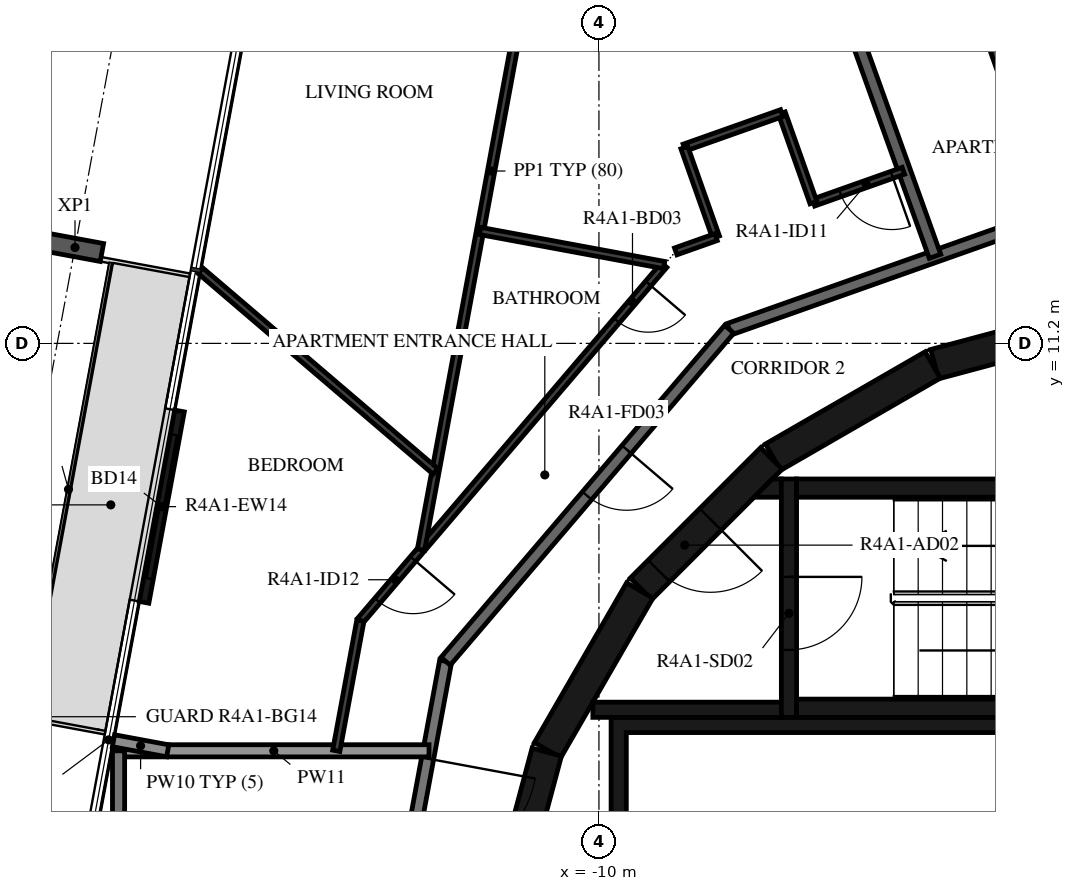
"""IFC4 building model, lengths in metres.
Left out: names, types, materials, properties, quantities, classifications, styles, units other than length and angle.
Written with IfcOpenShell. Run it as: python <this file> out.ifc"""

import sys

from ifc_helpers import new_model, si_unit, direction, frame, frame_2d, origin, origin_2d, place, context, subcontext, project, spatial, polyline, rectangle, i_section, outline, extrude, element, fill, save


model = new_model("IFC4")
c1 = context("Model", 3, precision=1e-05, world=origin(), true_north=direction((0.0, 1.0)))
c2 = subcontext(c1, "Body", "Model", "MODEL_VIEW")
j1 = project(units=[si_unit("LENGTHUNIT", "METRE"), si_unit("PLANEANGLEUNIT", "RADIAN")], contexts=[c1])
p1 = place(None, origin())
s1 = spatial("IfcSite", under=j1, at=p1, CompositionType="ELEMENT")
p2 = place(p1, origin())
s2 = spatial("IfcBuilding", under=s1, at=p2, CompositionType="ELEMENT")
p3 = place(p2, frame((0.0, 0.0, 155.2)))
s3 = spatial("IfcBuildingStorey", under=s2, at=p3, CompositionType="ELEMENT", Elevation=155.2)
p4 = place(p3, frame((-18.616, 12.777, -0.38), z_axis=(0.0, 0.0, 1.0), x_axis=(0.182235967681, 0.983254825609, 0.0)))
e1 = element("IfcColumn", 1, at=p4, inside=s3, PredefinedType="COLUMN", context=c2, shape_type="SweptSolid", body=[
    extrude(i_section(OverallWidth=0.3, OverallDepth=0.9, WebThickness=0.019, FlangeThickness=0.035, FilletRadius=0.03, at=origin_2d()), origin(), (0.0, 0.0, 1.0), 3.5),
])
p5 = place(p3, frame((-16.897, 10.088, 0.0), z_axis=(0.0, 0.0, 1.0), x_axis=(-0.18226136951, -0.983250117307, 0.0)))
e2 = element("IfcWall", 2, at=p5, inside=s3, PredefinedType="STANDARD", context=c2, shape_type="SweptSolid", body=[
    extrude(rectangle(XDim=3.2, YDim=0.16, at=frame_2d((1.6, 0.0))), origin(), (0.0, 0.0, 1.0), 3.12),
])
p6 = place(p5, frame((0.4, 0.0, 0.0)))
e3 = element("IfcOpeningElement", 3, at=p6, cuts=e2, PredefinedType="OPENING", context=c2, shape_type="SweptSolid", body=[
    extrude(rectangle(XDim=2.4, YDim=2.4, at=frame_2d((1.2, 1.2))), frame((0.0, 0.09, 0.0), z_axis=(0.0, -1.0, 0.0), x_axis=(1.0, 0.0, 0.0)), (0.0, 0.0, 1.0), 0.18),
])
for number, where, z_axis, x_axis in (
    (4, (-1.55, 11.643, 0.0), (0.0, 0.0, 1.0), (-0.966, -0.259, 0.0)),
    (5, (-4.51, 10.845, 0.0), (0.0, 0.0, 1.0), (-0.866, -0.5, 0.0)),
):
    element("IfcWall", number, at=place(p3, frame(where, z_axis=z_axis, x_axis=x_axis)), inside=s3, PredefinedType="SHEAR", context=c2, shape_type="SweptSolid", body=[
        extrude(rectangle(XDim=3.033, YDim=0.5, at=frame_2d((1.516, 0.0))), origin(), (0.0, 0.0, 1.0), 3.12),
    ])
p7 = place(p3, frame((-7.164, 9.308, 0.0), z_axis=(0.0, 0.0, 1.0), x_axis=(-0.707106781187, -0.707106781187, 0.0)))
e6 = element("IfcWall", 6, at=p7, inside=s3, PredefinedType="SHEAR", context=c2, shape_type="SweptSolid", body=[
    extrude(rectangle(XDim=3.032, YDim=0.5, at=frame_2d((1.516, 0.0))), origin(), (0.0, 0.0, 1.0), 3.12),
])
p8 = place(p7, frame((1.416, 0.0, 0.0)))
e7 = element("IfcOpeningElement", 7, at=p8, cuts=e6, PredefinedType="OPENING", context=c2, shape_type="SweptSolid", body=[
    extrude(rectangle(XDim=1.2, YDim=2.1, at=frame_2d((0.6, 1.05))), frame((0.0, 0.26, 0.0), z_axis=(0.0, -1.0, 0.0), x_axis=(1.0, 0.0, 0.0)), (0.0, 0.0, 1.0), 0.52),
])
for number, where, z_axis, x_axis in (
    (8, (-9.329, 7.137, 0.0), (0.0, 0.0, 1.0), (-0.5, -0.866, 0.0)),
    (9, (-10.858, 4.479, 0.0), (0.0, 0.0, 1.0), (-0.259, -0.966, 0.0)),
):
    element("IfcWall", number, at=place(p3, frame(where, z_axis=z_axis, x_axis=x_axis)), inside=s3, PredefinedType="SHEAR", context=c2, shape_type="SweptSolid", body=[
        extrude(rectangle(XDim=3.033, YDim=0.5, at=frame_2d((1.516, 0.0))), origin(), (0.0, 0.0, 1.0), 3.12),
    ])
for number, where, z_axis, x_axis in (
    (10, (-6.75, 5.2, 0.0), (0.0, 0.0, 1.0), (1.0, 0.0, 0.0)),
    (11, (-6.75, 8.82, 0.0), (0.0, 0.0, 1.0), (1.0, 0.0, 0.0)),
):
    element("IfcWall", number, at=place(p3, frame(where, z_axis=z_axis, x_axis=x_axis)), inside=s3, PredefinedType="SHEAR", context=c2, shape_type="SweptSolid", body=[
        extrude(rectangle(XDim=6.75, YDim=0.3, at=frame_2d((3.375, 0.0))), origin(), (0.0, 0.0, 1.0), 3.12),
    ])
p9 = place(p3, frame((-6.875, 8.97, 0.0), z_axis=(0.0, 0.0, 1.0), x_axis=(0.0, -1.0, 0.0)))
e12 = element("IfcWall", 12, at=p9, inside=s3, PredefinedType="SHEAR", context=c2, shape_type="SweptSolid", body=[
    extrude(rectangle(XDim=3.92, YDim=0.25, at=frame_2d((1.96, 0.0))), origin(), (0.0, 0.0, 1.0), 3.12),
])
p10 = place(p9, frame((1.61, 0.0, 0.0)))
e13 = element("IfcOpeningElement", 13, at=p10, cuts=e12, PredefinedType="OPENING", context=c2, shape_type="SweptSolid", body=[
    extrude(rectangle(XDim=1.2, YDim=2.1, at=frame_2d((0.6, 1.05))), frame((0.0, 0.135, 0.0), z_axis=(0.0, -1.0, 0.0), x_axis=(1.0, 0.0, 0.0)), (0.0, 0.0, 1.0), 0.27),
])
p11 = place(p3, frame((-7.0, 5.175, 0.0), z_axis=(0.0, 0.0, 1.0), x_axis=(-1.0, 0.0, 0.0)))
e14 = element("IfcWall", 14, at=p11, inside=s3, PredefinedType="SHEAR", context=c2, shape_type="SweptSolid", body=[
    extrude(rectangle(XDim=3.1, YDim=0.25, at=frame_2d((1.55, 0.0))), origin(), (0.0, 0.0, 1.0), 3.12),
])
p12 = place(p3, origin())
e15 = element("IfcWall", 15, at=p12, inside=s3, PredefinedType="SHEAR", context=c2, shape_type="SweptSolid", body=[
    extrude(outline(polyline([(-7.148, 8.97), (-7.0, 8.97), (-7.0, 8.67), (-7.448, 8.67), (-7.148, 8.97)])), origin(), (0.0, 0.0, 1.0), 3.12),
])
p13 = place(p3, origin())
e16 = element("IfcWall", 16, at=p13, inside=s3, PredefinedType="SHEAR", context=c2, shape_type="SweptSolid", body=[
    extrude(outline(polyline([(-9.55, 4.8), (-1.2, 4.8), (-1.2, 1.9), (-0.95, 1.9), (-0.95, 4.8), (0.95, 4.8), (0.95, 1.9), (1.2, 1.9), (1.2, 4.8), (3.1, 4.8), (3.1, 1.9), (3.35, 1.9), (3.35, 4.8), (5.25, 4.8), (5.25, 1.9), (5.5, 1.9), (5.5, 4.8), (7.4, 4.8), (7.4, 1.9), (7.65, 1.9), (7.65, 4.8), (9.55, 4.8), (9.55, 1.9), (9.8, 1.9), (9.8, 4.8), (9.8, 5.05), (-9.8, 5.05), (-9.8, 4.8), (-9.8, 1.9), (-9.55, 1.9), (-9.55, 4.8)])), origin(), (0.0, 0.0, 1.0), 3.12),
])
p14 = place(p3, frame((-12.521, 5.972, 0.0), z_axis=(0.0, 0.0, 1.0), x_axis=(-0.182251559718, -0.983251935661, 0.0)))
e17 = element("IfcWall", 17, at=p14, inside=s3, PredefinedType="STANDARD", context=c2, shape_type="SweptSolid", body=[
    extrude(rectangle(XDim=5.117, YDim=0.2, at=frame_2d((2.559, 0.0))), origin(), (0.0, 0.0, 1.0), 3.12),
])
p15 = place(p14, frame((1.627, 0.0, 0.0)))
e18 = element("IfcOpeningElement", 18, at=p15, cuts=e17, PredefinedType="OPENING", context=c2, shape_type="SweptSolid", body=[
    extrude(rectangle(XDim=1.8, YDim=2.1, at=frame_2d((0.9, 1.05))), frame((0.0, 0.11, 0.0), z_axis=(0.0, -1.0, 0.0), x_axis=(1.0, 0.0, 0.0)), (0.0, 0.0, 1.0), 0.22),
])
p16 = place(p3, frame((-2.359, 13.38, 0.0), z_axis=(0.0, 0.0, 1.0), x_axis=(-0.942647529236, -0.333789807551, 0.0)))
e19 = element("IfcWall", 19, at=p16, inside=s3, PredefinedType="STANDARD", context=c2, shape_type="SweptSolid", body=[
    extrude(rectangle(XDim=5.833, YDim=0.2, at=frame_2d((2.917, 0.0))), origin(), (0.0, 0.0, 1.0), 3.12),
])
p17 = place(p3, frame((-7.858, 11.433, 0.0), z_axis=(0.0, 0.0, 1.0), x_axis=(-0.649440801937, -0.760412154545, 0.0)))
e20 = element("IfcWall", 20, at=p17, inside=s3, PredefinedType="STANDARD", context=c2, shape_type="SweptSolid", body=[
    extrude(rectangle(XDim=7.181, YDim=0.2, at=frame_2d((3.59, 0.0))), origin(), (0.0, 0.0, 1.0), 3.12),
])
p18 = place(p17, frame((2.6, 0.0, 0.0)))
e21 = element("IfcOpeningElement", 21, at=p18, cuts=e20, PredefinedType="OPENING", context=c2, shape_type="SweptSolid", body=[
    extrude(rectangle(XDim=1.0, YDim=2.1, at=frame_2d((0.5, 1.05))), frame((0.0, 0.11, 0.0), z_axis=(0.0, -1.0, 0.0), x_axis=(1.0, 0.0, 0.0)), (0.0, 0.0, 1.0), 0.22),
])
p19 = place(p3, frame((-12.794, 4.5, 0.0), z_axis=(0.0, 0.0, 1.0), x_axis=(-1.0, 0.0, 0.0)))
e22 = element("IfcWall", 22, at=p19, inside=s3, PredefinedType="STANDARD", context=c2, shape_type="SweptSolid", body=[
    extrude(rectangle(XDim=5.106, YDim=0.2, at=frame_2d((2.553, 0.0))), origin(), (0.0, 0.0, 1.0), 2.73),
])
p20 = place(p3, frame((-17.9, 4.5, 0.0), z_axis=(0.0, 0.0, 1.0), x_axis=(0.0, -1.0, 0.0)))
e23 = element("IfcWall", 23, at=p20, inside=s3, PredefinedType="STANDARD", context=c2, shape_type="SweptSolid", body=[
    extrude(rectangle(XDim=9.0, YDim=0.2, at=frame_2d((4.5, 0.0))), origin(), (0.0, 0.0, 1.0), 3.12),
])
p21 = place(p3, frame((-6.185, 17.402, 0.0), z_axis=(0.0, 0.0, 1.0), x_axis=(0.337736730281, -0.941240618024, 0.0)))
e24 = element("IfcWall", 24, at=p21, inside=s3, PredefinedType="STANDARD", context=c2, shape_type="SweptSolid", body=[
    extrude(rectangle(XDim=5.068, YDim=0.2, at=frame_2d((2.534, 0.0))), origin(), (0.0, 0.0, 1.0), 3.12),
])
p22 = place(p3, frame((-17.984, 4.665, 0.0), z_axis=(0.0, 0.0, 1.0), x_axis=(0.98328378843, -0.182079629313, 0.0)))
e25 = element("IfcWall", 25, at=p22, inside=s3, PredefinedType="STANDARD", context=c2, shape_type="SweptSolid", body=[
    extrude(rectangle(XDim=0.908, YDim=0.2, at=frame_2d((0.454, 0.0))), origin(), (0.0, 0.0, 1.0), 2.73),
])
p23 = place(p3, frame((8.702, 12.206, 0.0), z_axis=(0.0, 0.0, 1.0), x_axis=(-0.760401313718, 0.649453494945, 0.0)))
e26 = element("IfcWall", 26, at=p23, inside=s3, PredefinedType="PARTITIONING", context=c2, shape_type="SweptSolid", body=[
    extrude(rectangle(XDim=16.724, YDim=0.12, at=frame_2d((8.362, 0.0))), origin(), (0.0, 0.0, 1.0), 3.12),
])
p24 = place(p23, frame((0.2, 0.0, 0.0)))
e27 = element("IfcOpeningElement", 27, at=p24, cuts=e26, PredefinedType="OPENING", context=c2, shape_type="SweptSolid", body=[
    extrude(rectangle(XDim=0.9, YDim=2.1, at=frame_2d((0.45, 1.05))), frame((0.0, 0.07, 0.0), z_axis=(0.0, -1.0, 0.0), x_axis=(1.0, 0.0, 0.0)), (0.0, 0.0, 1.0), 0.14),
])
p25 = place(p23, frame((7.099, 0.0, 0.0)))
e28 = element("IfcOpeningElement", 28, at=p25, cuts=e26, PredefinedType="OPENING", context=c2, shape_type="SweptSolid", body=[
    extrude(rectangle(XDim=0.9, YDim=2.1, at=frame_2d((0.45, 1.05))), frame((0.0, 0.07, 0.0), z_axis=(0.0, -1.0, 0.0), x_axis=(1.0, 0.0, 0.0)), (0.0, 0.0, 1.0), 0.14),
])
p26 = place(p3, frame((-3.048, 14.727, 0.0), z_axis=(0.0, 0.0, 1.0), x_axis=(-0.333811603187, 0.942639811157, 0.0)))
e29 = element("IfcWall", 29, at=p26, inside=s3, PredefinedType="PARTITIONING", context=c2, shape_type="SweptSolid", body=[
    extrude(rectangle(XDim=5.087, YDim=0.12, at=frame_2d((2.543, 0.0))), origin(), (0.0, 0.0, 1.0), 3.12),
])
p27 = place(p3, frame((-4.993, 14.038, 0.0), z_axis=(0.0, 0.0, 1.0), x_axis=(-0.942685371668, -0.333682918418, 0.0)))
e30 = element("IfcWall", 30, at=p27, inside=s3, PredefinedType="PARTITIONING", context=c2, shape_type="SweptSolid", body=[
    extrude(rectangle(XDim=1.569, YDim=0.12, at=frame_2d((0.784, 0.0))), origin(), (0.0, 0.0, 1.0), 3.12),
])
p28 = place(p27, frame((0.2, 0.0, 0.0)))
e31 = element("IfcOpeningElement", 31, at=p28, cuts=e30, PredefinedType="OPENING", context=c2, shape_type="SweptSolid", body=[
    extrude(rectangle(XDim=0.9, YDim=2.1, at=frame_2d((0.45, 1.05))), frame((0.0, 0.07, 0.0), z_axis=(0.0, -1.0, 0.0), x_axis=(1.0, 0.0, 0.0)), (0.0, 0.0, 1.0), 0.14),
])
p29 = place(p3, frame((-6.472, 13.515, 0.0), z_axis=(0.0, 0.0, 1.0), x_axis=(-0.333809516424, 0.942640550127, 0.0)))
e32 = element("IfcWall", 32, at=p29, inside=s3, PredefinedType="PARTITIONING", context=c2, shape_type="SweptSolid", body=[
    extrude(rectangle(XDim=1.562, YDim=0.12, at=frame_2d((0.781, 0.0))), origin(), (0.0, 0.0, 1.0), 3.12),
])
p30 = place(p3, frame((-6.993, 14.987, 0.0), z_axis=(0.0, 0.0, 1.0), x_axis=(-0.942599915297, -0.33392424243, 0.0)))
e33 = element("IfcWall", 33, at=p30, inside=s3, PredefinedType="PARTITIONING", context=c2, shape_type="SweptSolid", body=[
    extrude(rectangle(XDim=1.7, YDim=0.12, at=frame_2d((0.85, 0.0))), origin(), (0.0, 0.0, 1.0), 3.12),
])
p31 = place(p3, frame((-8.596, 14.419, 0.0), z_axis=(0.0, 0.0, 1.0), x_axis=(0.333670576497, -0.942689740254, 0.0)))
e34 = element("IfcWall", 34, at=p31, inside=s3, PredefinedType="PARTITIONING", context=c2, shape_type="SweptSolid", body=[
    extrude(rectangle(XDim=1.562, YDim=0.12, at=frame_2d((0.781, 0.0))), origin(), (0.0, 0.0, 1.0), 3.12),
])
p32 = place(p3, frame((-8.075, 12.947, 0.0), z_axis=(0.0, 0.0, 1.0), x_axis=(-0.942649994227, -0.33378284615, 0.0)))
e35 = element("IfcWall", 35, at=p32, inside=s3, PredefinedType="PARTITIONING", context=c2, shape_type="SweptSolid", body=[
    extrude(rectangle(XDim=0.703, YDim=0.12, at=frame_2d((0.352, 0.0))), origin(), (0.0, 0.0, 1.0), 3.12),
])
p33 = place(p3, frame((-8.929, 12.488, 0.0), z_axis=(0.0, 0.0, 1.0), x_axis=(-0.64944646045, -0.760407321775, 0.0)))
e36 = element("IfcWall", 36, at=p33, inside=s3, PredefinedType="PARTITIONING", context=c2, shape_type="SweptSolid", body=[
    extrude(rectangle(XDim=7.69, YDim=0.12, at=frame_2d((3.845, 0.0))), origin(), (0.0, 0.0, 1.0), 3.12),
])
p34 = place(p33, frame((0.4, 0.0, 0.0)))
e37 = element("IfcOpeningElement", 37, at=p34, cuts=e36, PredefinedType="OPENING", context=c2, shape_type="SweptSolid", body=[
    extrude(rectangle(XDim=0.8, YDim=2.1, at=frame_2d((0.4, 1.05))), frame((0.0, 0.07, 0.0), z_axis=(0.0, -1.0, 0.0), x_axis=(1.0, 0.0, 0.0)), (0.0, 0.0, 1.0), 0.14),
])
p35 = place(p33, frame((6.356, 0.0, 0.0)))
e38 = element("IfcOpeningElement", 38, at=p35, cuts=e36, PredefinedType="OPENING", context=c2, shape_type="SweptSolid", body=[
    extrude(rectangle(XDim=0.9, YDim=2.1, at=frame_2d((0.45, 1.05))), frame((0.0, 0.07, 0.0), z_axis=(0.0, -1.0, 0.0), x_axis=(1.0, 0.0, 0.0)), (0.0, 0.0, 1.0), 0.14),
])
p36 = place(p3, frame((-13.923, 6.641, 0.0), z_axis=(0.0, 0.0, 1.0), x_axis=(-0.182209715759, -0.983259690765, 0.0)))
e39 = element("IfcWall", 39, at=p36, inside=s3, PredefinedType="PARTITIONING", context=c2, shape_type="SweptSolid", body=[
    extrude(rectangle(XDim=2.177, YDim=0.12, at=frame_2d((1.089, 0.0))), origin(), (0.0, 0.0, 1.0), 3.12),
])
p37 = place(p3, frame((-10.618, 20.262, 0.0), z_axis=(0.0, 0.0, 1.0), x_axis=(-0.182222468274, -0.983257327487, 0.0)))
e40 = element("IfcWall", 40, at=p37, inside=s3, PredefinedType="PARTITIONING", context=c2, shape_type="SweptSolid", body=[
    extrude(rectangle(XDim=12.667, YDim=0.12, at=frame_2d((6.333, 0.0))), origin(), (0.0, 0.0, 1.0), 3.12),
])
p38 = place(p37, frame((2.57, 0.0, 0.0)))
e41 = element("IfcOpeningElement", 41, at=p38, cuts=e40, PredefinedType="OPENING", context=c2, shape_type="SweptSolid", body=[
    extrude(rectangle(XDim=0.9, YDim=2.1, at=frame_2d((0.45, 1.05))), frame((0.0, 0.07, 0.0), z_axis=(0.0, -1.0, 0.0), x_axis=(1.0, 0.0, 0.0)), (0.0, 0.0, 1.0), 0.14),
])
p39 = place(p3, frame((-11.955, 13.049, 0.0), z_axis=(0.0, 0.0, 1.0), x_axis=(0.983247271586, -0.182276720725, 0.0)))
e42 = element("IfcWall", 42, at=p39, inside=s3, PredefinedType="PARTITIONING", context=c2, shape_type="SweptSolid", body=[
    extrude(rectangle(XDim=3.078, YDim=0.12, at=frame_2d((1.539, 0.0))), origin(), (0.0, 0.0, 1.0), 3.12),
])
p40 = place(p3, frame((-16.552, 12.394, 0.0), z_axis=(0.0, 0.0, 1.0), x_axis=(0.760425586578, -0.649425074414, 0.0)))
e43 = element("IfcWall", 43, at=p40, inside=s3, PredefinedType="PARTITIONING", context=c2, shape_type="SweptSolid", body=[
    extrude(rectangle(XDim=5.081, YDim=0.12, at=frame_2d((2.541, 0.0))), origin(), (0.0, 0.0, 1.0), 3.12),
])
p41 = place(p6, origin())
e44 = element("IfcDoor", 44, at=p41, inside=s3, OperationType="DOUBLE_DOOR_SLIDING", PredefinedType="DOOR", context=c2, shape_type="SweptSolid", body=[
    extrude(rectangle(XDim=2.4, YDim=2.4, at=frame_2d((1.2, 1.2))), frame((0.0, 0.025, 0.0), z_axis=(0.0, -1.0, 0.0), x_axis=(1.0, 0.0, 0.0)), (0.0, 0.0, 1.0), 0.05),
])
fill(e3, e44)
p42 = place(p10, origin())
e45 = element("IfcDoor", 45, at=p42, inside=s3, OperationType="SINGLE_SWING_LEFT", PredefinedType="DOOR", context=c2, shape_type="SweptSolid", body=[
    extrude(rectangle(XDim=1.2, YDim=2.1, at=frame_2d((0.6, 1.05))), frame((0.0, 0.025, 0.0), z_axis=(0.0, -1.0, 0.0), x_axis=(1.0, 0.0, 0.0)), (0.0, 0.0, 1.0), 0.05),
])
fill(e13, e45)
p43 = place(p8, origin())
e46 = element("IfcDoor", 46, at=p43, inside=s3, OperationType="SINGLE_SWING_RIGHT", PredefinedType="DOOR", context=c2, shape_type="SweptSolid", body=[
    extrude(rectangle(XDim=1.2, YDim=2.1, at=frame_2d((0.6, 1.05))), frame((0.0, 0.025, 0.0), z_axis=(0.0, -1.0, 0.0), x_axis=(1.0, 0.0, 0.0)), (0.0, 0.0, 1.0), 0.05),
])
fill(e7, e46)
p44 = place(p18, origin())
e47 = element("IfcDoor", 47, at=p44, inside=s3, OperationType="SINGLE_SWING_LEFT", PredefinedType="DOOR", context=c2, shape_type="SweptSolid", body=[
    extrude(rectangle(XDim=1.0, YDim=2.1, at=frame_2d((0.5, 1.05))), frame((0.0, 0.025, 0.0), z_axis=(0.0, -1.0, 0.0), x_axis=(1.0, 0.0, 0.0)), (0.0, 0.0, 1.0), 0.05),
])
fill(e21, e47)
p45 = place(p28, origin())
e48 = element("IfcDoor", 48, at=p45, inside=s3, OperationType="SINGLE_SWING_LEFT", PredefinedType="DOOR", context=c2, shape_type="SweptSolid", body=[
    extrude(rectangle(XDim=0.9, YDim=2.1, at=frame_2d((0.45, 1.05))), frame((0.0, 0.025, 0.0), z_axis=(0.0, -1.0, 0.0), x_axis=(1.0, 0.0, 0.0)), (0.0, 0.0, 1.0), 0.05),
])
fill(e31, e48)
p46 = place(p34, origin())
e49 = element("IfcDoor", 49, at=p46, inside=s3, OperationType="SINGLE_SWING_LEFT", PredefinedType="DOOR", context=c2, shape_type="SweptSolid", body=[
    extrude(rectangle(XDim=0.8, YDim=2.1, at=frame_2d((0.4, 1.05))), frame((0.0, 0.025, 0.0), z_axis=(0.0, -1.0, 0.0), x_axis=(1.0, 0.0, 0.0)), (0.0, 0.0, 1.0), 0.05),
])
fill(e37, e49)
p47 = place(p35, origin())
e50 = element("IfcDoor", 50, at=p47, inside=s3, OperationType="SINGLE_SWING_LEFT", PredefinedType="DOOR", context=c2, shape_type="SweptSolid", body=[
    extrude(rectangle(XDim=0.9, YDim=2.1, at=frame_2d((0.45, 1.05))), frame((0.0, 0.025, 0.0), z_axis=(0.0, -1.0, 0.0), x_axis=(1.0, 0.0, 0.0)), (0.0, 0.0, 1.0), 0.05),
])
fill(e38, e50)
p48 = place(p15, origin())
e51 = element("IfcDoor", 51, at=p48, inside=s3, OperationType="DOUBLE_DOOR_SINGLE_SWING", PredefinedType="DOOR", context=c2, shape_type="SweptSolid", body=[
    extrude(rectangle(XDim=1.8, YDim=2.1, at=frame_2d((0.9, 1.05))), frame((0.0, 0.025, 0.0), z_axis=(0.0, -1.0, 0.0), x_axis=(1.0, 0.0, 0.0)), (0.0, 0.0, 1.0), 0.05),
])
fill(e18, e51)
save(model, sys.argv[1])
